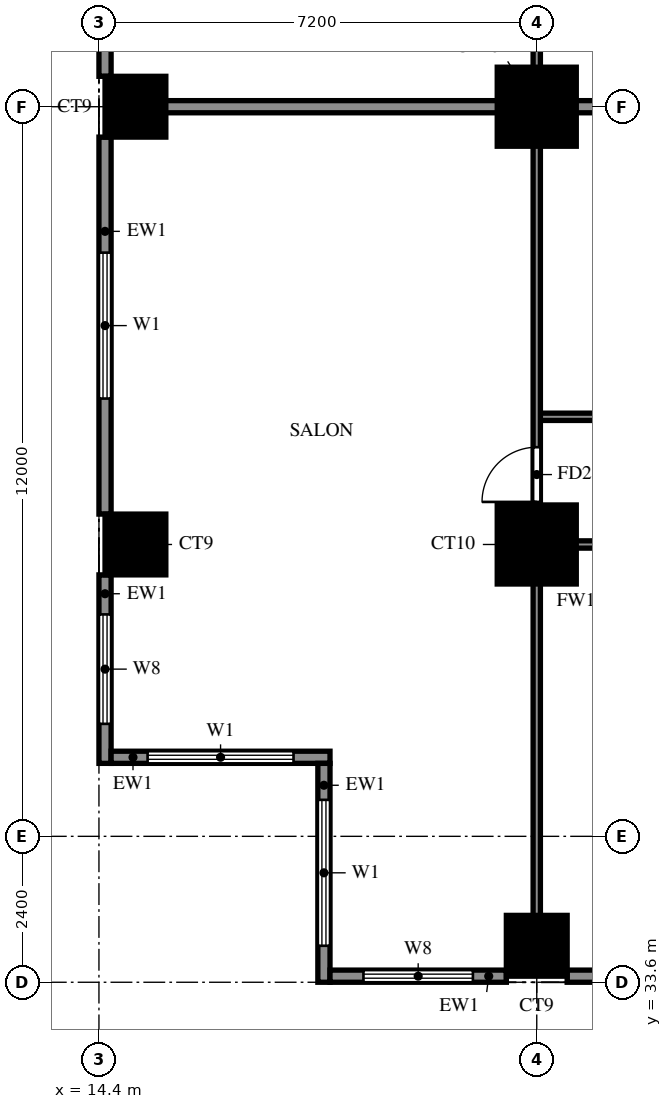
"""IFC4 building model, lengths in metres.
Left out: names, types, materials, properties, quantities, classifications, styles, units other than length and angle.
Written with IfcOpenShell. Run it as: python <this file> out.ifc"""

import sys

from ifc_helpers import new_model, si_unit, direction, frame, frame_2d, origin, origin_2d, place, context, subcontext, project, spatial, rectangle, extrude, source, transform, mapped, element, fill, save


model = new_model("IFC4")
c1 = context("Model", 3, precision=1e-05, world=origin(), true_north=direction((0.0, 1.0)))
c2 = subcontext(c1, "Body", "Model", "MODEL_VIEW")
j1 = project(units=[si_unit("LENGTHUNIT", "METRE"), si_unit("PLANEANGLEUNIT", "RADIAN")], contexts=[c1])
p1 = place(None, origin())
s1 = spatial("IfcSite", under=j1, at=p1, CompositionType="ELEMENT")
p2 = place(p1, origin())
s2 = spatial("IfcBuilding", under=s1, at=p2, CompositionType="ELEMENT")
p3 = place(p2, frame((0.0, 0.0, 83.0)))
s3 = spatial("IfcBuildingStorey", under=s2, at=p3, CompositionType="ELEMENT", Elevation=83.0)
m1 = source(origin(), c2, "Body", "SweptSolid", [
    extrude(rectangle(XDim=1.0, YDim=1.0, at=origin_2d()), origin(), (0.0, 0.0, 1.0), 3.18),
])
for number, where, z_axis, x_axis in (
    (1, (21.6, 34.2, 0.0), (0.0, 0.0, 1.0), (1.0, 0.0, 0.0)),
    (2, (15.0, 40.8, 0.0), (0.0, 0.0, 1.0), (1.0, 0.0, 0.0)),
):
    element("IfcColumn", number, at=place(p3, frame(where, z_axis=z_axis, x_axis=x_axis)), inside=s3, PredefinedType="COLUMN", context=c2, shape_type="MappedRepresentation", body=[
        mapped(m1, transform((0.0, 0.0, 0.0))),
    ])
m2 = source(origin(), c2, "Body", "SweptSolid", [
    extrude(rectangle(XDim=1.3, YDim=1.3, at=origin_2d()), origin(), (0.0, 0.0, 1.0), 3.18),
])
p4 = place(p3, frame((21.6, 40.8, 0.0), z_axis=(0.0, 0.0, 1.0), x_axis=(1.0, 0.0, 0.0)))
e3 = element("IfcColumn", 3, at=p4, inside=s3, PredefinedType="COLUMN", context=c2, shape_type="MappedRepresentation", body=[
    mapped(m2, transform((0.0, 0.0, 0.0))),
])
p5 = place(p3, frame((15.0, 48.0, 0.0), z_axis=(0.0, 0.0, 1.0), x_axis=(1.0, 0.0, 0.0)))
e4 = element("IfcColumn", 4, at=p5, inside=s3, PredefinedType="COLUMN", context=c2, shape_type="MappedRepresentation", body=[
    mapped(m1, transform((0.0, 0.0, 0.0))),
])
p6 = place(p3, frame((21.6, 48.0, 0.0), z_axis=(0.0, 0.0, 1.0), x_axis=(1.0, 0.0, 0.0)))
e5 = element("IfcColumn", 5, at=p6, inside=s3, PredefinedType="COLUMN", context=c2, shape_type="MappedRepresentation", body=[
    mapped(m2, transform((0.0, 0.0, 0.0))),
])
p7 = place(p3, frame((14.5, 54.7, 0.0), z_axis=(0.0, 0.0, 1.0), x_axis=(0.0, -1.0, 0.0)))
e6 = element("IfcWall", 6, at=p7, inside=s3, PredefinedType="SOLIDWALL", context=c2, shape_type="SweptSolid", body=[
    extrude(rectangle(XDim=6.2, YDim=0.2, at=frame_2d((3.1, 0.0))), origin(), (0.0, 0.0, 1.0), 3.18),
])
p8 = place(p7, frame((0.4, 0.0, 0.0)))
e7 = element("IfcOpeningElement", 7, at=p8, cuts=e6, PredefinedType="OPENING", context=c2, shape_type="SweptSolid", body=[
    extrude(rectangle(XDim=1.8, YDim=2.4, at=frame_2d((0.9, 1.2))), frame((0.0, 0.11, 0.0), z_axis=(0.0, -1.0, 0.0), x_axis=(1.0, 0.0, 0.0)), (0.0, 0.0, 1.0), 0.22),
])
p9 = place(p7, frame((4.55, 0.0, 0.6)))
e8 = element("IfcOpeningElement", 8, at=p9, cuts=e6, PredefinedType="OPENING", context=c2, shape_type="SweptSolid", body=[
    extrude(rectangle(XDim=1.2, YDim=2.4, at=frame_2d((0.6, 1.2))), frame((0.0, 0.11, 0.0), z_axis=(0.0, -1.0, 0.0), x_axis=(1.0, 0.0, 0.0)), (0.0, 0.0, 1.0), 0.22),
])
p10 = place(p3, frame((14.5, 47.5, 0.0), z_axis=(0.0, 0.0, 1.0), x_axis=(0.0, -1.0, 0.0)))
e9 = element("IfcWall", 9, at=p10, inside=s3, PredefinedType="SOLIDWALL", context=c2, shape_type="SweptSolid", body=[
    extrude(rectangle(XDim=6.2, YDim=0.2, at=frame_2d((3.1, 0.0))), origin(), (0.0, 0.0, 1.0), 3.18),
])
p11 = place(p10, frame((1.9, 0.0, 0.6)))
e10 = element("IfcOpeningElement", 10, at=p11, cuts=e9, PredefinedType="OPENING", context=c2, shape_type="SweptSolid", body=[
    extrude(rectangle(XDim=2.4, YDim=2.4, at=frame_2d((1.2, 1.2))), frame((0.0, 0.11, 0.0), z_axis=(0.0, -1.0, 0.0), x_axis=(1.0, 0.0, 0.0)), (0.0, 0.0, 1.0), 0.22),
])
p12 = place(p3, frame((14.5, 40.3, 0.0), z_axis=(0.0, 0.0, 1.0), x_axis=(0.0, -1.0, 0.0)))
e11 = element("IfcWall", 11, at=p12, inside=s3, PredefinedType="SOLIDWALL", context=c2, shape_type="SweptSolid", body=[
    extrude(rectangle(XDim=3.1, YDim=0.2, at=frame_2d((1.55, 0.0))), origin(), (0.0, 0.0, 1.0), 3.18),
])
p13 = place(p12, frame((0.65, 0.0, 0.6)))
e12 = element("IfcOpeningElement", 12, at=p13, cuts=e11, PredefinedType="OPENING", context=c2, shape_type="SweptSolid", body=[
    extrude(rectangle(XDim=1.8, YDim=2.4, at=frame_2d((0.9, 1.2))), frame((0.0, 0.11, 0.0), z_axis=(0.0, -1.0, 0.0), x_axis=(1.0, 0.0, 0.0)), (0.0, 0.0, 1.0), 0.22),
])
p14 = place(p3, frame((14.6, 37.3, 0.0), z_axis=(0.0, 0.0, 1.0), x_axis=(1.0, 0.0, 0.0)))
e13 = element("IfcWall", 13, at=p14, inside=s3, PredefinedType="SOLIDWALL", context=c2, shape_type="SweptSolid", body=[
    extrude(rectangle(XDim=3.6, YDim=0.2, at=frame_2d((1.8, 0.0))), origin(), (0.0, 0.0, 1.0), 3.18),
])
p15 = place(p14, frame((0.6, 0.0, 0.6)))
e14 = element("IfcOpeningElement", 14, at=p15, cuts=e13, PredefinedType="OPENING", context=c2, shape_type="SweptSolid", body=[
    extrude(rectangle(XDim=2.4, YDim=2.4, at=frame_2d((1.2, 1.2))), frame((0.0, 0.11, 0.0), z_axis=(0.0, -1.0, 0.0), x_axis=(1.0, 0.0, 0.0)), (0.0, 0.0, 1.0), 0.22),
])
p16 = place(p3, frame((18.1, 37.2, 0.0), z_axis=(0.0, 0.0, 1.0), x_axis=(0.0, -1.0, 0.0)))
e15 = element("IfcWall", 15, at=p16, inside=s3, PredefinedType="SOLIDWALL", context=c2, shape_type="SweptSolid", body=[
    extrude(rectangle(XDim=3.6, YDim=0.2, at=frame_2d((1.8, 0.0))), origin(), (0.0, 0.0, 1.0), 3.18),
])
p17 = place(p16, frame((0.6, 0.0, 0.6)))
e16 = element("IfcOpeningElement", 16, at=p17, cuts=e15, PredefinedType="OPENING", context=c2, shape_type="SweptSolid", body=[
    extrude(rectangle(XDim=2.4, YDim=2.4, at=frame_2d((1.2, 1.2))), frame((0.0, 0.11, 0.0), z_axis=(0.0, -1.0, 0.0), x_axis=(1.0, 0.0, 0.0)), (0.0, 0.0, 1.0), 0.22),
])
p18 = place(p3, frame((18.2, 33.7, 0.0), z_axis=(0.0, 0.0, 1.0), x_axis=(1.0, 0.0, 0.0)))
e17 = element("IfcWall", 17, at=p18, inside=s3, PredefinedType="SOLIDWALL", context=c2, shape_type="SweptSolid", body=[
    extrude(rectangle(XDim=2.9, YDim=0.2, at=frame_2d((1.45, 0.0))), origin(), (0.0, 0.0, 1.0), 3.18),
])
p19 = place(p18, frame((0.55, 0.0, 0.6)))
e18 = element("IfcOpeningElement", 18, at=p19, cuts=e17, PredefinedType="OPENING", context=c2, shape_type="SweptSolid", body=[
    extrude(rectangle(XDim=1.8, YDim=2.4, at=frame_2d((0.9, 1.2))), frame((0.0, 0.11, 0.0), z_axis=(0.0, -1.0, 0.0), x_axis=(1.0, 0.0, 0.0)), (0.0, 0.0, 1.0), 0.22),
])
p20 = place(p3, frame((22.1, 33.7, 0.0), z_axis=(0.0, 0.0, 1.0), x_axis=(1.0, 0.0, 0.0)))
e19 = element("IfcWall", 19, at=p20, inside=s3, PredefinedType="SOLIDWALL", context=c2, shape_type="SweptSolid", body=[
    extrude(rectangle(XDim=6.2, YDim=0.2, at=frame_2d((3.1, 0.0))), origin(), (0.0, 0.0, 1.0), 3.18),
])
p21 = place(p20, frame((0.75, 0.0, 0.6)))
e20 = element("IfcOpeningElement", 20, at=p21, cuts=e19, PredefinedType="OPENING", context=c2, shape_type="SweptSolid", body=[
    extrude(rectangle(XDim=1.8, YDim=2.4, at=frame_2d((0.9, 1.2))), frame((0.0, 0.11, 0.0), z_axis=(0.0, -1.0, 0.0), x_axis=(1.0, 0.0, 0.0)), (0.0, 0.0, 1.0), 0.22),
])
p22 = place(p20, frame((4.1, 0.0, 1.5)))
e21 = element("IfcOpeningElement", 21, at=p22, cuts=e19, PredefinedType="OPENING", context=c2, shape_type="SweptSolid", body=[
    extrude(rectangle(XDim=0.9, YDim=0.9, at=frame_2d((0.45, 0.45))), frame((0.0, 0.11, 0.0), z_axis=(0.0, -1.0, 0.0), x_axis=(1.0, 0.0, 0.0)), (0.0, 0.0, 1.0), 0.22),
])
p23 = place(p3, frame((14.525, 48.0, 0.0), z_axis=(0.0, 0.0, 1.0), x_axis=(1.0, 0.0, 0.0)))
e22 = element("IfcWall", 22, at=p23, inside=s3, PredefinedType="SOLIDWALL", context=c2, shape_type="SweptSolid", body=[
    extrude(rectangle(XDim=19.075, YDim=0.2, at=frame_2d((9.538, 0.0))), origin(), (0.0, 0.0, 1.0), 3.18),
])
p24 = place(p3, frame((21.6, 40.8, 0.0), z_axis=(0.0, 0.0, 1.0), x_axis=(1.0, 0.0, 0.0)))
e23 = element("IfcWall", 23, at=p24, inside=s3, PredefinedType="PARTITIONING", context=c2, shape_type="SweptSolid", body=[
    extrude(rectangle(XDim=3.6, YDim=0.12, at=frame_2d((1.8, 0.0))), origin(), (0.0, 0.0, 1.0), 3.18),
])
p25 = place(p24, frame((1.35, 0.0, 0.0)))
e24 = element("IfcOpeningElement", 24, at=p25, cuts=e23, PredefinedType="OPENING", context=c2, shape_type="SweptSolid", body=[
    extrude(rectangle(XDim=0.9, YDim=2.1, at=frame_2d((0.45, 1.05))), frame((0.0, 0.07, 0.0), z_axis=(0.0, -1.0, 0.0), x_axis=(1.0, 0.0, 0.0)), (0.0, 0.0, 1.0), 0.14),
])
p26 = place(p3, frame((21.6, 42.9, 0.0), z_axis=(0.0, 0.0, 1.0), x_axis=(1.0, 0.0, 0.0)))
e25 = element("IfcWall", 25, at=p26, inside=s3, PredefinedType="PARTITIONING", context=c2, shape_type="SweptSolid", body=[
    extrude(rectangle(XDim=14.4, YDim=0.12, at=frame_2d((7.2, 0.0))), origin(), (0.0, 0.0, 1.0), 3.18),
])
p27 = place(p26, frame((2.1, 0.0, 0.0)))
e26 = element("IfcOpeningElement", 26, at=p27, cuts=e25, PredefinedType="OPENING", context=c2, shape_type="SweptSolid", body=[
    extrude(rectangle(XDim=0.9, YDim=2.1, at=frame_2d((0.45, 1.05))), frame((0.0, 0.07, 0.0), z_axis=(0.0, -1.0, 0.0), x_axis=(1.0, 0.0, 0.0)), (0.0, 0.0, 1.0), 0.14),
])
p28 = place(p26, frame((5.85, 0.0, 0.0)))
e27 = element("IfcOpeningElement", 27, at=p28, cuts=e25, PredefinedType="OPENING", context=c2, shape_type="SweptSolid", body=[
    extrude(rectangle(XDim=0.8, YDim=2.1, at=frame_2d((0.4, 1.05))), frame((0.0, 0.07, 0.0), z_axis=(0.0, -1.0, 0.0), x_axis=(1.0, 0.0, 0.0)), (0.0, 0.0, 1.0), 0.14),
])
p29 = place(p26, frame((9.25, 0.0, 0.0)))
e28 = element("IfcOpeningElement", 28, at=p29, cuts=e25, PredefinedType="OPENING", context=c2, shape_type="SweptSolid", body=[
    extrude(rectangle(XDim=0.9, YDim=2.1, at=frame_2d((0.45, 1.05))), frame((0.0, 0.07, 0.0), z_axis=(0.0, -1.0, 0.0), x_axis=(1.0, 0.0, 0.0)), (0.0, 0.0, 1.0), 0.14),
])
p30 = place(p3, frame((21.6, 33.725, 0.0), z_axis=(0.0, 0.0, 1.0), x_axis=(0.0, 1.0, 0.0)))
e29 = element("IfcWall", 29, at=p30, inside=s3, PredefinedType="PARTITIONING", context=c2, shape_type="SweptSolid", body=[
    extrude(rectangle(XDim=32.275, YDim=0.12, at=frame_2d((16.137, 0.0))), origin(), (0.0, 0.0, 1.0), 3.18),
])
p31 = place(p30, frame((7.775, 0.0, 0.0)))
e30 = element("IfcOpeningElement", 30, at=p31, cuts=e29, PredefinedType="OPENING", context=c2, shape_type="SweptSolid", body=[
    extrude(rectangle(XDim=0.9, YDim=2.1, at=frame_2d((0.45, 1.05))), frame((0.0, 0.07, 0.0), z_axis=(0.0, -1.0, 0.0), x_axis=(1.0, 0.0, 0.0)), (0.0, 0.0, 1.0), 0.14),
])
p32 = place(p30, frame((15.625, 0.0, 0.0)))
e31 = element("IfcOpeningElement", 31, at=p32, cuts=e29, PredefinedType="OPENING", context=c2, shape_type="SweptSolid", body=[
    extrude(rectangle(XDim=0.9, YDim=2.1, at=frame_2d((0.45, 1.05))), frame((0.0, 0.07, 0.0), z_axis=(0.0, -1.0, 0.0), x_axis=(1.0, 0.0, 0.0)), (0.0, 0.0, 1.0), 0.14),
])
p33 = place(p30, frame((22.225, 0.0, 0.0)))
e32 = element("IfcOpeningElement", 32, at=p33, cuts=e29, PredefinedType="OPENING", context=c2, shape_type="SweptSolid", body=[
    extrude(rectangle(XDim=1.5, YDim=2.1, at=frame_2d((0.75, 1.05))), frame((0.0, 0.07, 0.0), z_axis=(0.0, -1.0, 0.0), x_axis=(1.0, 0.0, 0.0)), (0.0, 0.0, 1.0), 0.14),
])
p34 = place(p30, frame((26.425, 0.0, 0.0)))
e33 = element("IfcOpeningElement", 33, at=p34, cuts=e29, PredefinedType="OPENING", context=c2, shape_type="SweptSolid", body=[
    extrude(rectangle(XDim=0.9, YDim=2.1, at=frame_2d((0.45, 1.05))), frame((0.0, 0.07, 0.0), z_axis=(0.0, -1.0, 0.0), x_axis=(1.0, 0.0, 0.0)), (0.0, 0.0, 1.0), 0.14),
])
p35 = place(p30, frame((30.025, 0.0, 0.0)))
e34 = element("IfcOpeningElement", 34, at=p35, cuts=e29, PredefinedType="OPENING", context=c2, shape_type="SweptSolid", body=[
    extrude(rectangle(XDim=0.9, YDim=2.1, at=frame_2d((0.45, 1.05))), frame((0.0, 0.07, 0.0), z_axis=(0.0, -1.0, 0.0), x_axis=(1.0, 0.0, 0.0)), (0.0, 0.0, 1.0), 0.14),
])
p36 = place(p11, origin())
e35 = element("IfcWindow", 35, at=p36, inside=s3, PartitioningType="DOUBLE_PANEL_VERTICAL", PredefinedType="WINDOW", context=c2, shape_type="SweptSolid", body=[
    extrude(rectangle(XDim=2.4, YDim=2.4, at=frame_2d((1.2, 1.2))), frame((0.0, 0.03, 0.0), z_axis=(0.0, -1.0, 0.0), x_axis=(1.0, 0.0, 0.0)), (0.0, 0.0, 1.0), 0.06),
])
fill(e10, e35)
p37 = place(p13, origin())
e36 = element("IfcWindow", 36, at=p37, inside=s3, PartitioningType="DOUBLE_PANEL_VERTICAL", PredefinedType="WINDOW", context=c2, shape_type="SweptSolid", body=[
    extrude(rectangle(XDim=1.8, YDim=2.4, at=frame_2d((0.9, 1.2))), frame((0.0, 0.03, 0.0), z_axis=(0.0, -1.0, 0.0), x_axis=(1.0, 0.0, 0.0)), (0.0, 0.0, 1.0), 0.06),
])
fill(e12, e36)
p38 = place(p15, origin())
e37 = element("IfcWindow", 37, at=p38, inside=s3, PartitioningType="DOUBLE_PANEL_VERTICAL", PredefinedType="WINDOW", context=c2, shape_type="SweptSolid", body=[
    extrude(rectangle(XDim=2.4, YDim=2.4, at=frame_2d((1.2, 1.2))), frame((0.0, 0.03, 0.0), z_axis=(0.0, -1.0, 0.0), x_axis=(1.0, 0.0, 0.0)), (0.0, 0.0, 1.0), 0.06),
])
fill(e14, e37)
p39 = place(p17, origin())
e38 = element("IfcWindow", 38, at=p39, inside=s3, PartitioningType="DOUBLE_PANEL_VERTICAL", PredefinedType="WINDOW", context=c2, shape_type="SweptSolid", body=[
    extrude(rectangle(XDim=2.4, YDim=2.4, at=frame_2d((1.2, 1.2))), frame((0.0, 0.03, 0.0), z_axis=(0.0, -1.0, 0.0), x_axis=(1.0, 0.0, 0.0)), (0.0, 0.0, 1.0), 0.06),
])
fill(e16, e38)
p40 = place(p19, origin())
e39 = element("IfcWindow", 39, at=p40, inside=s3, PartitioningType="DOUBLE_PANEL_VERTICAL", PredefinedType="WINDOW", context=c2, shape_type="SweptSolid", body=[
    extrude(rectangle(XDim=1.8, YDim=2.4, at=frame_2d((0.9, 1.2))), frame((0.0, 0.03, 0.0), z_axis=(0.0, -1.0, 0.0), x_axis=(1.0, 0.0, 0.0)), (0.0, 0.0, 1.0), 0.06),
])
fill(e18, e39)
p41 = place(p31, origin())
e40 = element("IfcDoor", 40, at=p41, inside=s3, OperationType="SINGLE_SWING_RIGHT", PredefinedType="DOOR", context=c2, shape_type="SweptSolid", body=[
    extrude(rectangle(XDim=0.9, YDim=2.1, at=frame_2d((0.45, 1.05))), frame((0.0, 0.025, 0.0), z_axis=(0.0, -1.0, 0.0), x_axis=(1.0, 0.0, 0.0)), (0.0, 0.0, 1.0), 0.05),
])
fill(e30, e40)
save(model, sys.argv[1])
